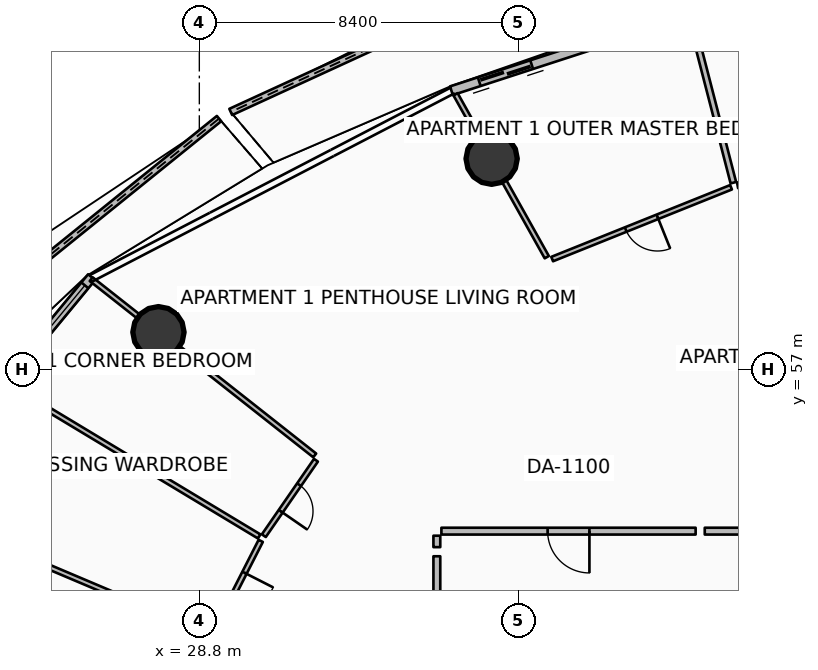
"""IFC4 building model, lengths in metres.
Left out: names, types, materials, properties, quantities, classifications, styles, units other than length and angle.
Written with IfcOpenShell. Run it as: python <this file> out.ifc"""

import sys

from ifc_helpers import new_model, si_unit, direction, frame, frame_2d, origin, origin_2d, place, context, subcontext, project, spatial, polyline, rectangle, circle, outline, extrude, element, fill, save


model = new_model("IFC4")
c1 = context("Model", 3, precision=1e-05, world=origin(), true_north=direction((0.0, 1.0)))
c2 = subcontext(c1, "Body", "Model", "MODEL_VIEW")
j1 = project(units=[si_unit("LENGTHUNIT", "METRE"), si_unit("PLANEANGLEUNIT", "RADIAN")], contexts=[c1])
p1 = place(None, origin())
s1 = spatial("IfcSite", under=j1, at=p1, CompositionType="ELEMENT")
p2 = place(p1, origin())
s2 = spatial("IfcBuilding", under=s1, at=p2, CompositionType="ELEMENT")
p3 = place(p2, frame((0.0, 0.0, 33.9)))
s3 = spatial("IfcBuildingStorey", under=s2, at=p3, CompositionType="ELEMENT", Elevation=33.9)
for number, where, z_axis, x_axis in (
    (1, (36.492, 62.55, 0.0), (0.0, 0.0, 1.0), (1.0, 0.0, 0.0)),
    (2, (27.724, 57.984, 0.0), (0.0, 0.0, 1.0), (1.0, 0.0, 0.0)),
):
    element("IfcColumn", number, at=place(p3, frame(where, z_axis=z_axis, x_axis=x_axis)), inside=s3, PredefinedType="COLUMN", context=c2, shape_type="SweptSolid", body=[
        extrude(circle(Radius=0.675, at=origin_2d()), origin(), (0.0, 0.0, 1.0), 3.5),
    ])
p4 = place(p3, frame((39.347, 68.246, 0.0), z_axis=(0.0, 0.0, 1.0), x_axis=(-0.908702116292, -0.417445162681, 0.0)))
e3 = element("IfcWall", 3, at=p4, inside=s3, PredefinedType="PARAPET", context=c2, shape_type="SweptSolid", body=[
    extrude(outline(polyline([(0.0, 0.0), (10.697, 0.0), (10.697, 1.233), (5.348, 1.418), (0.0, 1.632), (0.0, 0.0)])), frame((0.0, 0.09, 0.0), z_axis=(0.0, -1.0, 0.0), x_axis=(1.0, 0.0, 0.0)), (0.0, 0.0, 1.0), 0.18),
])
p5 = place(p3, frame((29.318, 63.605, 0.0), z_axis=(0.0, 0.0, 1.0), x_axis=(-0.778164801363, -0.628060141961, 0.0)))
e4 = element("IfcWall", 4, at=p5, inside=s3, PredefinedType="PARAPET", context=c2, shape_type="SweptSolid", body=[
    extrude(outline(polyline([(0.0, 0.0), (11.677, 0.0), (11.677, 1.148), (5.838, 1.127), (0.0, 1.224), (0.0, 0.0)])), frame((0.0, 0.09, 0.0), z_axis=(0.0, -1.0, 0.0), x_axis=(1.0, 0.0, 0.0)), (0.0, 0.0, 1.0), 0.18),
])
p6 = place(p3, frame((45.036, 67.458, 0.0), z_axis=(0.0, 0.0, 1.0), x_axis=(-0.951054679225, -0.309022648238, 0.0)))
e5 = element("IfcWall", 5, at=p6, inside=s3, PredefinedType="SOLIDWALL", context=c2, shape_type="SweptSolid", body=[
    extrude(rectangle(XDim=10.097, YDim=0.24, at=frame_2d((5.048, 0.0))), origin(), (0.0, 0.0, 1.0), 2.45),
])
p7 = place(p6, frame((7.877, 0.0, 0.0)))
e6 = element("IfcOpeningElement", 6, at=p7, cuts=e5, PredefinedType="OPENING", context=c2, shape_type="SweptSolid", body=[
    extrude(rectangle(XDim=1.45, YDim=2.15, at=frame_2d((0.725, 1.075))), frame((0.0, 0.13, 0.0), z_axis=(0.0, -1.0, 0.0), x_axis=(1.0, 0.0, 0.0)), (0.0, 0.0, 1.0), 0.26),
])
p8 = place(p6, frame((0.28, 0.0, 0.65)))
e7 = element("IfcOpeningElement", 7, at=p8, cuts=e5, PredefinedType="OPENING", context=c2, shape_type="SweptSolid", body=[
    extrude(rectangle(XDim=1.6, YDim=1.5, at=frame_2d((0.8, 0.75))), frame((0.0, 0.13, 0.0), z_axis=(0.0, -1.0, 0.0), x_axis=(1.0, 0.0, 0.0)), (0.0, 0.0, 1.0), 0.26),
])
p9 = place(p3, frame((25.967, 59.433, 0.0), z_axis=(0.0, 0.0, 1.0), x_axis=(-0.636674332663, -0.771132799281, 0.0)))
e8 = element("IfcWall", 8, at=p9, inside=s3, PredefinedType="SOLIDWALL", context=c2, shape_type="SweptSolid", body=[
    extrude(rectangle(XDim=11.851, YDim=0.24, at=frame_2d((5.926, 0.0))), origin(), (0.0, 0.0, 1.0), 2.45),
])
p10 = place(p9, frame((9.631, 0.0, 0.0)))
e9 = element("IfcOpeningElement", 9, at=p10, cuts=e8, PredefinedType="OPENING", context=c2, shape_type="SweptSolid", body=[
    extrude(rectangle(XDim=1.45, YDim=2.15, at=frame_2d((0.725, 1.075))), frame((0.0, 0.13, 0.0), z_axis=(0.0, -1.0, 0.0), x_axis=(1.0, 0.0, 0.0)), (0.0, 0.0, 1.0), 0.26),
])
p11 = place(p9, frame((0.28, 0.0, 0.65)))
e10 = element("IfcOpeningElement", 10, at=p11, cuts=e8, PredefinedType="OPENING", context=c2, shape_type="SweptSolid", body=[
    extrude(rectangle(XDim=1.6, YDim=1.5, at=frame_2d((0.8, 0.75))), frame((0.0, 0.13, 0.0), z_axis=(0.0, -1.0, 0.0), x_axis=(1.0, 0.0, 0.0)), (0.0, 0.0, 1.0), 0.26),
])
p12 = place(p3, frame((41.86, 52.75, 0.0), z_axis=(0.0, 0.0, 1.0), x_axis=(-1.0, 0.0, 0.0)))
e11 = element("IfcWall", 11, at=p12, inside=s3, PredefinedType="PARTITIONING", context=c2, shape_type="SweptSolid", body=[
    extrude(rectangle(XDim=6.69, YDim=0.18, at=frame_2d((3.345, 0.0))), origin(), (0.0, 0.0, 1.0), 2.867),
])
p13 = place(p12, frame((2.795, 0.0, 0.0)))
e12 = element("IfcOpeningElement", 12, at=p13, cuts=e11, PredefinedType="OPENING", context=c2, shape_type="SweptSolid", body=[
    extrude(rectangle(XDim=1.1, YDim=2.1, at=frame_2d((0.55, 1.05))), frame((0.0, 0.1, 0.0), z_axis=(0.0, -1.0, 0.0), x_axis=(1.0, 0.0, 0.0)), (0.0, 0.0, 1.0), 0.2),
])
p14 = place(p3, frame((35.05, 52.63, 0.0), z_axis=(0.0, 0.0, 1.0), x_axis=(0.0, -1.0, 0.0)))
e13 = element("IfcWall", 13, at=p14, inside=s3, PredefinedType="PARTITIONING", context=c2, shape_type="SweptSolid", body=[
    extrude(rectangle(XDim=0.301, YDim=0.18, at=frame_2d((0.15, 0.0))), origin(), (0.0, 0.0, 1.0), 2.867),
])
p15 = place(p3, frame((46.608, 52.75, 0.0), z_axis=(0.0, 0.0, 1.0), x_axis=(-1.0, 0.0, 0.0)))
e14 = element("IfcWall", 14, at=p15, inside=s3, PredefinedType="PARTITIONING", context=c2, shape_type="SweptSolid", body=[
    extrude(rectangle(XDim=4.508, YDim=0.18, at=frame_2d((2.254, 0.0))), origin(), (0.0, 0.0, 1.0), 2.867),
])
p16 = place(p3, frame((37.943, 59.958, 0.0), z_axis=(0.0, 0.0, 1.0), x_axis=(-0.488606395453, 0.872504321091, 0.0)))
e15 = element("IfcWall", 15, at=p16, inside=s3, PredefinedType="PARTITIONING", context=c2, shape_type="SweptSolid", body=[
    extrude(rectangle(XDim=4.913, YDim=0.125, at=frame_2d((2.457, 0.0))), origin(), (0.0, 0.0, 1.0), 2.867),
])
p17 = place(p3, frame((45.494, 62.323, 0.0), z_axis=(0.0, 0.0, 1.0), x_axis=(-0.982882919375, -0.184231286161, 0.0)))
e16 = element("IfcWall", 16, at=p17, inside=s3, PredefinedType="PARTITIONING", context=c2, shape_type="SweptSolid", body=[
    extrude(rectangle(XDim=2.575, YDim=0.15, at=frame_2d((1.288, 0.0))), origin(), (0.0, 0.0, 1.0), 2.867),
])
p18 = place(p17, frame((0.862, 0.0, 0.0)))
e17 = element("IfcOpeningElement", 17, at=p18, cuts=e16, PredefinedType="OPENING", context=c2, shape_type="SweptSolid", body=[
    extrude(rectangle(XDim=0.85, YDim=2.06, at=frame_2d((0.425, 1.03))), frame((0.0, 0.085, 0.0), z_axis=(0.0, -1.0, 0.0), x_axis=(1.0, 0.0, 0.0)), (0.0, 0.0, 1.0), 0.17),
])
p19 = place(p3, frame((42.852, 61.919, 0.0), z_axis=(0.0, 0.0, 1.0), x_axis=(-0.250174852853, 0.968200672898, 0.0)))
e18 = element("IfcWall", 18, at=p19, inside=s3, PredefinedType="PARTITIONING", context=c2, shape_type="SweptSolid", body=[
    extrude(rectangle(XDim=4.477, YDim=0.15, at=frame_2d((2.239, 0.0))), origin(), (0.0, 0.0, 1.0), 2.94),
])
p20 = place(p3, frame((42.792, 61.798, 0.0), z_axis=(0.0, 0.0, 1.0), x_axis=(-0.928027868691, -0.372510771566, 0.0)))
e19 = element("IfcWall", 19, at=p20, inside=s3, PredefinedType="PARTITIONING", context=c2, shape_type="SweptSolid", body=[
    extrude(rectangle(XDim=5.072, YDim=0.125, at=frame_2d((2.536, 0.0))), origin(), (0.0, 0.0, 1.0), 2.867),
])
p21 = place(p20, frame((2.086, 0.0, 0.0)))
e20 = element("IfcOpeningElement", 20, at=p21, cuts=e19, PredefinedType="OPENING", context=c2, shape_type="SweptSolid", body=[
    extrude(rectangle(XDim=0.9, YDim=2.08, at=frame_2d((0.45, 1.04))), frame((0.0, 0.073, 0.0), z_axis=(0.0, -1.0, 0.0), x_axis=(1.0, 0.0, 0.0)), (0.0, 0.0, 1.0), 0.145),
])
p22 = place(p3, frame((35.05, 52.089, 0.0), z_axis=(0.0, 0.0, 1.0), x_axis=(0.0, -1.0, 0.0)))
e21 = element("IfcWall", 21, at=p22, inside=s3, PredefinedType="PARTITIONING", context=c2, shape_type="SweptSolid", body=[
    extrude(rectangle(XDim=6.317, YDim=0.18, at=frame_2d((3.158, 0.0))), origin(), (0.0, 0.0, 1.0), 2.867),
])
p23 = place(p3, frame((31.836, 54.743, 0.0), z_axis=(0.0, 0.0, 1.0), x_axis=(-0.785333171854, 0.619073347178, 0.0)))
e22 = element("IfcWall", 22, at=p23, inside=s3, PredefinedType="PARTITIONING", context=c2, shape_type="SweptSolid", body=[
    extrude(rectangle(XDim=7.489, YDim=0.125, at=frame_2d((3.745, 0.0))), origin(), (0.0, 0.0, 1.0), 2.867),
])
p24 = place(p3, frame((30.375, 52.611, 0.0), z_axis=(0.0, 0.0, 1.0), x_axis=(-0.856697740307, 0.515818748936, 0.0)))
e23 = element("IfcWall", 23, at=p24, inside=s3, PredefinedType="PARTITIONING", context=c2, shape_type="SweptSolid", body=[
    extrude(rectangle(XDim=7.704, YDim=0.125, at=frame_2d((3.852, 0.0))), origin(), (0.0, 0.0, 1.0), 2.94),
])
p25 = place(p3, frame((29.055, 50.022, 0.0), z_axis=(0.0, 0.0, 1.0), x_axis=(-0.920841617163, 0.389936810395, 0.0)))
e24 = element("IfcWall", 24, at=p25, inside=s3, PredefinedType="PARTITIONING", context=c2, shape_type="SweptSolid", body=[
    extrude(rectangle(XDim=8.613, YDim=0.125, at=frame_2d((4.306, 0.0))), origin(), (0.0, 0.0, 1.0), 2.94),
])
p26 = place(p3, frame((31.869, 54.615, 0.0), z_axis=(0.0, 0.0, 1.0), x_axis=(-0.568588801709, -0.822621890404, 0.0)))
e25 = element("IfcWall", 25, at=p26, inside=s3, PredefinedType="PARTITIONING", context=c2, shape_type="SweptSolid", body=[
    extrude(rectangle(XDim=2.412, YDim=0.125, at=frame_2d((1.206, 0.0))), origin(), (0.0, 0.0, 1.0), 2.867),
])
p27 = place(p26, frame((0.781, 0.0, 0.0)))
e26 = element("IfcOpeningElement", 26, at=p27, cuts=e25, PredefinedType="OPENING", context=c2, shape_type="SweptSolid", body=[
    extrude(rectangle(XDim=0.85, YDim=2.06, at=frame_2d((0.425, 1.03))), frame((0.0, 0.073, 0.0), z_axis=(0.0, -1.0, 0.0), x_axis=(1.0, 0.0, 0.0)), (0.0, 0.0, 1.0), 0.145),
])
p28 = place(p3, frame((30.416, 52.493, 0.0), z_axis=(0.0, 0.0, 1.0), x_axis=(-0.454024795493, -0.890989048798, 0.0)))
e27 = element("IfcWall", 27, at=p28, inside=s3, PredefinedType="PARTITIONING", context=c2, shape_type="SweptSolid", body=[
    extrude(rectangle(XDim=2.733, YDim=0.125, at=frame_2d((1.367, 0.0))), origin(), (0.0, 0.0, 1.0), 2.94),
])
p29 = place(p28, frame((0.942, 0.0, 0.0)))
e28 = element("IfcOpeningElement", 28, at=p29, cuts=e27, PredefinedType="OPENING", context=c2, shape_type="SweptSolid", body=[
    extrude(rectangle(XDim=0.85, YDim=2.06, at=frame_2d((0.425, 1.03))), frame((0.0, 0.073, 0.0), z_axis=(0.0, -1.0, 0.0), x_axis=(1.0, 0.0, 0.0)), (0.0, 0.0, 1.0), 0.145),
])
p30 = place(p7, origin())
e29 = element("IfcDoor", 29, at=p30, inside=s3, OperationType="DOUBLE_DOOR_SLIDING", PredefinedType="DOOR", context=c2, shape_type="SweptSolid", body=[
    extrude(rectangle(XDim=1.45, YDim=2.15, at=frame_2d((0.725, 1.075))), frame((0.0, 0.025, 0.0), z_axis=(0.0, -1.0, 0.0), x_axis=(1.0, 0.0, 0.0)), (0.0, 0.0, 1.0), 0.05),
])
fill(e6, e29)
p31 = place(p11, origin())
e30 = element("IfcWindow", 30, at=p31, inside=s3, PartitioningType="SINGLE_PANEL", PredefinedType="WINDOW", context=c2, shape_type="SweptSolid", body=[
    extrude(rectangle(XDim=1.6, YDim=1.5, at=frame_2d((0.8, 0.75))), frame((0.0, 0.03, 0.0), z_axis=(0.0, -1.0, 0.0), x_axis=(1.0, 0.0, 0.0)), (0.0, 0.0, 1.0), 0.06),
])
fill(e10, e30)
p32 = place(p13, origin())
e31 = element("IfcDoor", 31, at=p32, inside=s3, OperationType="SINGLE_SWING_LEFT", PredefinedType="DOOR", context=c2, shape_type="SweptSolid", body=[
    extrude(rectangle(XDim=1.1, YDim=2.1, at=frame_2d((0.55, 1.05))), frame((0.0, 0.025, 0.0), z_axis=(0.0, -1.0, 0.0), x_axis=(1.0, 0.0, 0.0)), (0.0, 0.0, 1.0), 0.05),
])
fill(e12, e31)
p33 = place(p21, origin())
e32 = element("IfcDoor", 32, at=p33, inside=s3, OperationType="SINGLE_SWING_LEFT", PredefinedType="DOOR", context=c2, shape_type="SweptSolid", body=[
    extrude(rectangle(XDim=0.9, YDim=2.08, at=frame_2d((0.45, 1.04))), frame((0.0, 0.025, 0.0), z_axis=(0.0, -1.0, 0.0), x_axis=(1.0, 0.0, 0.0)), (0.0, 0.0, 1.0), 0.05),
])
fill(e20, e32)
p34 = place(p27, origin())
e33 = element("IfcDoor", 33, at=p34, inside=s3, OperationType="SINGLE_SWING_RIGHT", PredefinedType="DOOR", context=c2, shape_type="SweptSolid", body=[
    extrude(rectangle(XDim=0.85, YDim=2.06, at=frame_2d((0.425, 1.03))), frame((0.0, 0.025, 0.0), z_axis=(0.0, -1.0, 0.0), x_axis=(1.0, 0.0, 0.0)), (0.0, 0.0, 1.0), 0.05),
])
fill(e26, e33)
p35 = place(p29, origin())
e34 = element("IfcDoor", 34, at=p35, inside=s3, OperationType="SINGLE_SWING_LEFT", PredefinedType="DOOR", context=c2, shape_type="SweptSolid", body=[
    extrude(rectangle(XDim=0.85, YDim=2.06, at=frame_2d((0.425, 1.03))), frame((0.0, 0.025, 0.0), z_axis=(0.0, -1.0, 0.0), x_axis=(1.0, 0.0, 0.0)), (0.0, 0.0, 1.0), 0.05),
])
fill(e28, e34)
save(model, sys.argv[1])
